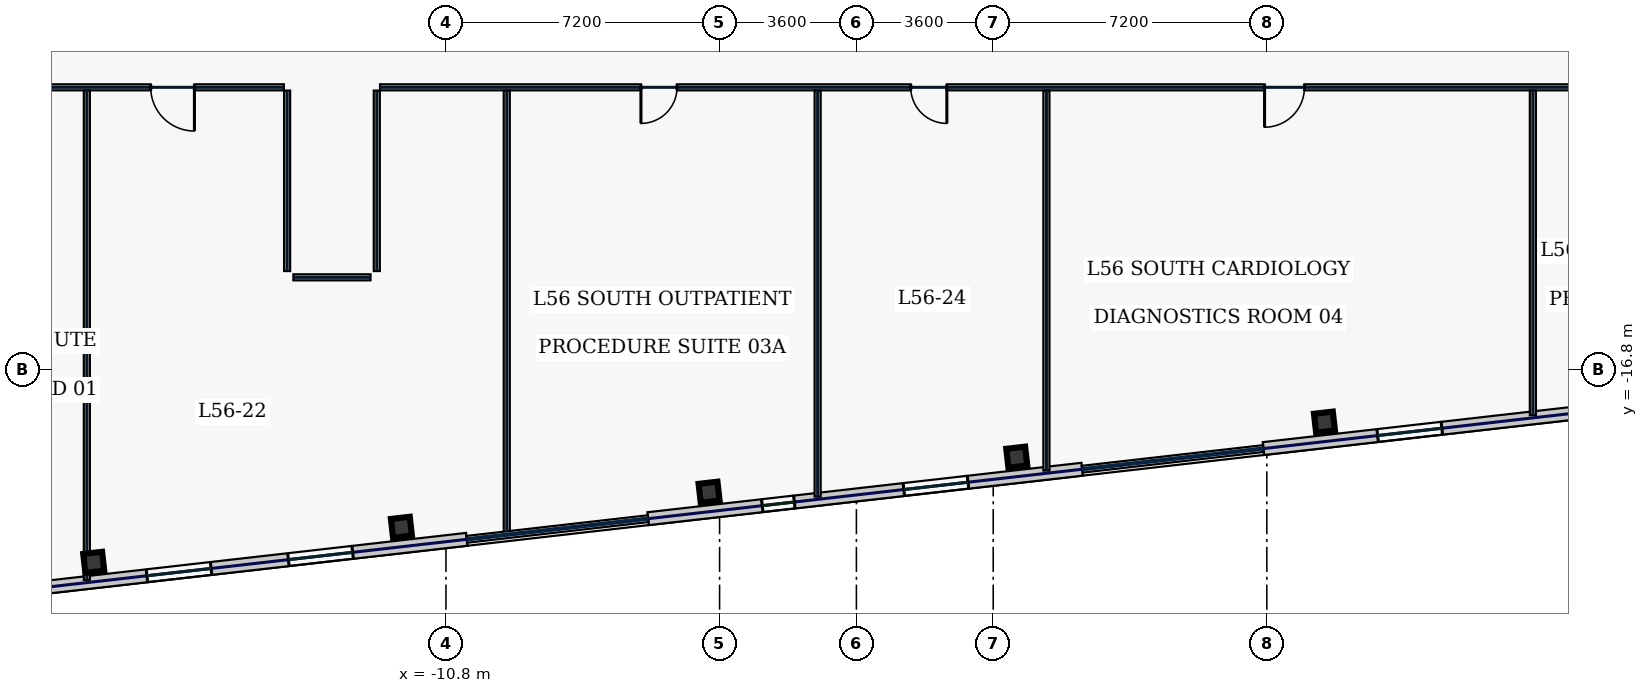
"""IFC4 building model, lengths in metres.
Left out: names, types, materials, properties, quantities, classifications, styles, units other than length and angle.
Written with IfcOpenShell. Run it as: python <this file> out.ifc"""

import sys

from ifc_helpers import new_model, si_unit, direction, frame, frame_2d, origin, origin_2d, place, context, subcontext, project, spatial, rectangle, hollow_rectangle, extrude, element, fill, save


model = new_model("IFC4")
c1 = context("Model", 3, precision=1e-05, world=origin(), true_north=direction((0.0, 1.0)))
c2 = subcontext(c1, "Body", "Model", "MODEL_VIEW")
j1 = project(units=[si_unit("LENGTHUNIT", "METRE"), si_unit("PLANEANGLEUNIT", "RADIAN")], contexts=[c1])
p1 = place(None, origin())
s1 = spatial("IfcSite", under=j1, at=p1, CompositionType="ELEMENT")
p2 = place(p1, origin())
s2 = spatial("IfcBuilding", under=s1, at=p2, CompositionType="ELEMENT")
p3 = place(p2, frame((0.0, 0.0, 243.0)))
s3 = spatial("IfcBuildingStorey", under=s2, at=p3, CompositionType="ELEMENT", Elevation=243.0)
for number, where, z_axis, x_axis in (
    (1, (-20.069, -21.88, 0.0), (0.0, 0.0, 1.0), (0.994, 0.113, 0.0)),
    (2, (-11.972, -20.958, 0.0), (0.0, 0.0, 1.0), (0.994, 0.113, 0.0)),
    (3, (-3.876, -20.035, 0.0), (0.0, 0.0, 1.0), (0.994, 0.113, 0.0)),
    (4, (4.22, -19.113, 0.0), (0.0, 0.0, 1.0), (0.994, 0.113, 0.0)),
    (5, (12.316, -18.19, 0.0), (0.0, 0.0, 1.0), (0.994, 0.113, 0.0)),
):
    element("IfcColumn", number, at=place(p3, frame(where, z_axis=z_axis, x_axis=x_axis)), inside=s3, PredefinedType="COLUMN", context=c2, shape_type="SweptSolid", body=[
        extrude(hollow_rectangle(XDim=0.5, YDim=0.5, WallThickness=0.025, at=origin_2d()), origin(), (0.0, 0.0, 1.0), 3.74),
    ])
p4 = place(p3, frame((-28.783, -23.386, 0.0), z_axis=(0.0, 0.0, 1.0), x_axis=(0.993572271362, 0.113199565282, 0.0)))
e6 = element("IfcWall", 6, at=p4, inside=s3, PredefinedType="STANDARD", context=c2, shape_type="SweptSolid", body=[
    extrude(rectangle(XDim=18.651, YDim=0.34, at=frame_2d((9.326, 0.0))), origin(), (0.0, 0.0, 1.0), 3.74),
])
p5 = place(p4, frame((2.03, 0.0, 0.88)))
e7 = element("IfcOpeningElement", 7, at=p5, cuts=e6, PredefinedType="OPENING", context=c2, shape_type="SweptSolid", body=[
    extrude(rectangle(XDim=0.85, YDim=1.85, at=frame_2d((0.425, 0.925))), frame((0.0, 0.18, 0.0), z_axis=(0.0, -1.0, 0.0), x_axis=(1.0, 0.0, 0.0)), (0.0, 0.0, 1.0), 0.36),
])
p6 = place(p4, frame((5.779, 0.0, 0.88)))
e8 = element("IfcOpeningElement", 8, at=p6, cuts=e6, PredefinedType="OPENING", context=c2, shape_type="SweptSolid", body=[
    extrude(rectangle(XDim=1.7, YDim=1.95, at=frame_2d((0.85, 0.975))), frame((0.0, 0.18, 0.0), z_axis=(0.0, -1.0, 0.0), x_axis=(1.0, 0.0, 0.0)), (0.0, 0.0, 1.0), 0.36),
])
p7 = place(p4, frame((10.179, 0.0, 0.88)))
e9 = element("IfcOpeningElement", 9, at=p7, cuts=e6, PredefinedType="OPENING", context=c2, shape_type="SweptSolid", body=[
    extrude(rectangle(XDim=1.7, YDim=1.95, at=frame_2d((0.85, 0.975))), frame((0.0, 0.18, 0.0), z_axis=(0.0, -1.0, 0.0), x_axis=(1.0, 0.0, 0.0)), (0.0, 0.0, 1.0), 0.36),
])
p8 = place(p4, frame((13.927, 0.0, 0.88)))
e10 = element("IfcOpeningElement", 10, at=p8, cuts=e6, PredefinedType="OPENING", context=c2, shape_type="SweptSolid", body=[
    extrude(rectangle(XDim=1.7, YDim=1.95, at=frame_2d((0.85, 0.975))), frame((0.0, 0.18, 0.0), z_axis=(0.0, -1.0, 0.0), x_axis=(1.0, 0.0, 0.0)), (0.0, 0.0, 1.0), 0.36),
])
p9 = place(p3, frame((-5.482, -20.731, 0.0), z_axis=(0.0, 0.0, 1.0), x_axis=(0.993571968199, 0.113202226169, 0.0)))
e11 = element("IfcWall", 11, at=p9, inside=s3, PredefinedType="STANDARD", context=c2, shape_type="SweptSolid", body=[
    extrude(rectangle(XDim=11.497, YDim=0.34, at=frame_2d((5.749, 0.0))), origin(), (0.0, 0.0, 1.0), 3.74),
])
p10 = place(p9, frame((3.024, 0.0, 0.88)))
e12 = element("IfcOpeningElement", 12, at=p10, cuts=e11, PredefinedType="OPENING", context=c2, shape_type="SweptSolid", body=[
    extrude(rectangle(XDim=0.85, YDim=1.85, at=frame_2d((0.425, 0.925))), frame((0.0, 0.18, 0.0), z_axis=(0.0, -1.0, 0.0), x_axis=(1.0, 0.0, 0.0)), (0.0, 0.0, 1.0), 0.36),
])
p11 = place(p9, frame((6.773, 0.0, 0.88)))
e13 = element("IfcOpeningElement", 13, at=p11, cuts=e11, PredefinedType="OPENING", context=c2, shape_type="SweptSolid", body=[
    extrude(rectangle(XDim=1.7, YDim=1.95, at=frame_2d((0.85, 0.975))), frame((0.0, 0.18, 0.0), z_axis=(0.0, -1.0, 0.0), x_axis=(1.0, 0.0, 0.0)), (0.0, 0.0, 1.0), 0.36),
])
p12 = place(p3, frame((10.71, -18.886, 0.0), z_axis=(0.0, 0.0, 1.0), x_axis=(0.993572271362, 0.113199565282, 0.0)))
e14 = element("IfcWall", 14, at=p12, inside=s3, PredefinedType="STANDARD", context=c2, shape_type="SweptSolid", body=[
    extrude(rectangle(XDim=18.651, YDim=0.34, at=frame_2d((9.326, 0.0))), origin(), (0.0, 0.0, 1.0), 3.74),
])
p13 = place(p12, frame((3.024, 0.0, 0.88)))
e15 = element("IfcOpeningElement", 15, at=p13, cuts=e14, PredefinedType="OPENING", context=c2, shape_type="SweptSolid", body=[
    extrude(rectangle(XDim=1.7, YDim=1.95, at=frame_2d((0.85, 0.975))), frame((0.0, 0.18, 0.0), z_axis=(0.0, -1.0, 0.0), x_axis=(1.0, 0.0, 0.0)), (0.0, 0.0, 1.0), 0.36),
])
p14 = place(p12, frame((11.173, 0.0, 0.88)))
e16 = element("IfcOpeningElement", 16, at=p14, cuts=e14, PredefinedType="OPENING", context=c2, shape_type="SweptSolid", body=[
    extrude(rectangle(XDim=1.7, YDim=1.95, at=frame_2d((0.85, 0.975))), frame((0.0, 0.18, 0.0), z_axis=(0.0, -1.0, 0.0), x_axis=(1.0, 0.0, 0.0)), (0.0, 0.0, 1.0), 0.36),
])
p15 = place(p12, frame((14.921, 0.0, 0.88)))
e17 = element("IfcOpeningElement", 17, at=p15, cuts=e14, PredefinedType="OPENING", context=c2, shape_type="SweptSolid", body=[
    extrude(rectangle(XDim=1.7, YDim=1.95, at=frame_2d((0.85, 0.975))), frame((0.0, 0.18, 0.0), z_axis=(0.0, -1.0, 0.0), x_axis=(1.0, 0.0, 0.0)), (0.0, 0.0, 1.0), 0.36),
])
p16 = place(p3, frame((24.815, -9.38, 0.0), z_axis=(0.0, 0.0, 1.0), x_axis=(-1.0, 0.0, 0.0)))
e18 = element("IfcWall", 18, at=p16, inside=s3, PredefinedType="PARTITIONING", context=c2, shape_type="SweptSolid", body=[
    extrude(rectangle(XDim=37.35, YDim=0.16, at=frame_2d((18.675, 0.0))), origin(), (0.0, 0.0, 1.0), 3.74),
])
p17 = place(p16, frame((29.535, 0.0, 0.0)))
e19 = element("IfcOpeningElement", 19, at=p17, cuts=e18, PredefinedType="OPENING", context=c2, shape_type="SweptSolid", body=[
    extrude(rectangle(XDim=0.95, YDim=2.2, at=frame_2d((0.475, 1.1))), frame((0.0, 0.09, 0.0), z_axis=(0.0, -1.0, 0.0), x_axis=(1.0, 0.0, 0.0)), (0.0, 0.0, 1.0), 0.18),
])
p18 = place(p16, frame((22.435, 0.0, 0.0)))
e20 = element("IfcOpeningElement", 20, at=p18, cuts=e18, PredefinedType="OPENING", context=c2, shape_type="SweptSolid", body=[
    extrude(rectangle(XDim=0.95, YDim=2.2, at=frame_2d((0.475, 1.1))), frame((0.0, 0.09, 0.0), z_axis=(0.0, -1.0, 0.0), x_axis=(1.0, 0.0, 0.0)), (0.0, 0.0, 1.0), 0.18),
])
p19 = place(p16, frame((13.025, 0.0, 0.0)))
e21 = element("IfcOpeningElement", 21, at=p19, cuts=e18, PredefinedType="OPENING", context=c2, shape_type="SweptSolid", body=[
    extrude(rectangle(XDim=1.05, YDim=2.2, at=frame_2d((0.525, 1.1))), frame((0.0, 0.09, 0.0), z_axis=(0.0, -1.0, 0.0), x_axis=(1.0, 0.0, 0.0)), (0.0, 0.0, 1.0), 0.18),
])
p20 = place(p16, frame((3.269, 0.0, 0.0)))
e22 = element("IfcOpeningElement", 22, at=p20, cuts=e18, PredefinedType="OPENING", context=c2, shape_type="SweptSolid", body=[
    extrude(rectangle(XDim=0.95, YDim=2.2, at=frame_2d((0.475, 1.1))), frame((0.0, 0.09, 0.0), z_axis=(0.0, -1.0, 0.0), x_axis=(1.0, 0.0, 0.0)), (0.0, 0.0, 1.0), 0.18),
])
p21 = place(p3, frame((-12.62, -9.465, 0.0), z_axis=(0.0, 0.0, 1.0), x_axis=(0.0, -1.0, 0.0)))
e23 = element("IfcWall", 23, at=p21, inside=s3, PredefinedType="PARTITIONING", context=c2, shape_type="SweptSolid", body=[
    extrude(rectangle(XDim=4.75, YDim=0.16, at=frame_2d((2.375, 0.0))), origin(), (0.0, 0.0, 1.0), 3.74),
])
p22 = place(p3, frame((-12.785, -14.38, 0.0), z_axis=(0.0, 0.0, 1.0), x_axis=(-1.0, 0.0, 0.0)))
e24 = element("IfcWall", 24, at=p22, inside=s3, PredefinedType="PARTITIONING", context=c2, shape_type="SweptSolid", body=[
    extrude(rectangle(XDim=2.03, YDim=0.16, at=frame_2d((1.015, 0.0))), origin(), (0.0, 0.0, 1.0), 3.74),
])
p23 = place(p3, frame((-14.98, -14.215, 0.0), z_axis=(0.0, 0.0, 1.0), x_axis=(0.0, 1.0, 0.0)))
e25 = element("IfcWall", 25, at=p23, inside=s3, PredefinedType="PARTITIONING", context=c2, shape_type="SweptSolid", body=[
    extrude(rectangle(XDim=4.75, YDim=0.16, at=frame_2d((2.375, 0.0))), origin(), (0.0, 0.0, 1.0), 3.74),
])
p24 = place(p3, frame((-15.065, -9.38, 0.0), z_axis=(0.0, 0.0, 1.0), x_axis=(-1.0, 0.0, 0.0)))
e26 = element("IfcWall", 26, at=p24, inside=s3, PredefinedType="PARTITIONING", context=c2, shape_type="SweptSolid", body=[
    extrude(rectangle(XDim=9.75, YDim=0.16, at=frame_2d((4.875, 0.0))), origin(), (0.0, 0.0, 1.0), 3.74),
])
p25 = place(p24, frame((6.751, 0.0, 0.0)))
e27 = element("IfcOpeningElement", 27, at=p25, cuts=e26, PredefinedType="OPENING", context=c2, shape_type="SweptSolid", body=[
    extrude(rectangle(XDim=1.3, YDim=2.2, at=frame_2d((0.65, 1.1))), frame((0.0, 0.09, 0.0), z_axis=(0.0, -1.0, 0.0), x_axis=(1.0, 0.0, 0.0)), (0.0, 0.0, 1.0), 0.18),
])
p26 = place(p24, frame((2.354, 0.0, 0.0)))
e28 = element("IfcOpeningElement", 28, at=p26, cuts=e26, PredefinedType="OPENING", context=c2, shape_type="SweptSolid", body=[
    extrude(rectangle(XDim=1.15, YDim=2.2, at=frame_2d((0.575, 1.1))), frame((0.0, 0.09, 0.0), z_axis=(0.0, -1.0, 0.0), x_axis=(1.0, 0.0, 0.0)), (0.0, 0.0, 1.0), 0.18),
])
p27 = place(p3, frame((-20.25, -22.344, 0.0), z_axis=(0.0, 0.0, 1.0), x_axis=(0.0, 1.0, 0.0)))
e29 = element("IfcWall", 29, at=p27, inside=s3, PredefinedType="PARTITIONING", context=c2, shape_type="SweptSolid", body=[
    extrude(rectangle(XDim=12.878, YDim=0.16, at=frame_2d((6.439, 0.0))), origin(), (0.0, 0.0, 1.0), 3.74),
])
p28 = place(p3, frame((-9.2, -21.085, 0.0), z_axis=(0.0, 0.0, 1.0), x_axis=(0.0, 1.0, 0.0)))
e30 = element("IfcWall", 30, at=p28, inside=s3, PredefinedType="PARTITIONING", context=c2, shape_type="SweptSolid", body=[
    extrude(rectangle(XDim=11.62, YDim=0.16, at=frame_2d((5.81, 0.0))), origin(), (0.0, 0.0, 1.0), 3.74),
])
p29 = place(p3, frame((5.0, -19.467, 0.0), z_axis=(0.0, 0.0, 1.0), x_axis=(0.0, 1.0, 0.0)))
e31 = element("IfcWall", 31, at=p29, inside=s3, PredefinedType="PARTITIONING", context=c2, shape_type="SweptSolid", body=[
    extrude(rectangle(XDim=10.002, YDim=0.16, at=frame_2d((5.001, 0.0))), origin(), (0.0, 0.0, 1.0), 3.74),
])
p30 = place(p3, frame((17.8, -18.008, 0.0), z_axis=(0.0, 0.0, 1.0), x_axis=(0.0, 1.0, 0.0)))
e32 = element("IfcWall", 32, at=p30, inside=s3, PredefinedType="PARTITIONING", context=c2, shape_type="SweptSolid", body=[
    extrude(rectangle(XDim=8.543, YDim=0.16, at=frame_2d((4.271, 0.0))), origin(), (0.0, 0.0, 1.0), 3.74),
])
p31 = place(p3, frame((-1.02, -20.153, 0.0), z_axis=(0.0, 0.0, 1.0), x_axis=(0.0, 1.0, 0.0)))
e33 = element("IfcWall", 33, at=p31, inside=s3, PredefinedType="PARTITIONING", context=c2, shape_type="SweptSolid", body=[
    extrude(rectangle(XDim=10.688, YDim=0.16, at=frame_2d((5.344, 0.0))), origin(), (0.0, 0.0, 1.0), 3.74),
])
p32 = place(p7, origin())
e34 = element("IfcWindow", 34, at=p32, inside=s3, PartitioningType="SINGLE_PANEL", PredefinedType="WINDOW", context=c2, shape_type="SweptSolid", body=[
    extrude(rectangle(XDim=1.7, YDim=1.95, at=frame_2d((0.85, 0.975))), frame((0.0, 0.03, 0.0), z_axis=(0.0, -1.0, 0.0), x_axis=(1.0, 0.0, 0.0)), (0.0, 0.0, 1.0), 0.06),
])
fill(e9, e34)
p33 = place(p8, origin())
e35 = element("IfcWindow", 35, at=p33, inside=s3, PartitioningType="SINGLE_PANEL", PredefinedType="WINDOW", context=c2, shape_type="SweptSolid", body=[
    extrude(rectangle(XDim=1.7, YDim=1.95, at=frame_2d((0.85, 0.975))), frame((0.0, 0.03, 0.0), z_axis=(0.0, -1.0, 0.0), x_axis=(1.0, 0.0, 0.0)), (0.0, 0.0, 1.0), 0.06),
])
fill(e10, e35)
p34 = place(p10, origin())
e36 = element("IfcWindow", 36, at=p34, inside=s3, PartitioningType="SINGLE_PANEL", PredefinedType="WINDOW", context=c2, shape_type="SweptSolid", body=[
    extrude(rectangle(XDim=0.85, YDim=1.85, at=frame_2d((0.425, 0.925))), frame((0.0, 0.03, 0.0), z_axis=(0.0, -1.0, 0.0), x_axis=(1.0, 0.0, 0.0)), (0.0, 0.0, 1.0), 0.06),
])
fill(e12, e36)
p35 = place(p11, origin())
e37 = element("IfcWindow", 37, at=p35, inside=s3, PartitioningType="SINGLE_PANEL", PredefinedType="WINDOW", context=c2, shape_type="SweptSolid", body=[
    extrude(rectangle(XDim=1.7, YDim=1.95, at=frame_2d((0.85, 0.975))), frame((0.0, 0.03, 0.0), z_axis=(0.0, -1.0, 0.0), x_axis=(1.0, 0.0, 0.0)), (0.0, 0.0, 1.0), 0.06),
])
fill(e13, e37)
p36 = place(p13, origin())
e38 = element("IfcWindow", 38, at=p36, inside=s3, PartitioningType="SINGLE_PANEL", PredefinedType="WINDOW", context=c2, shape_type="SweptSolid", body=[
    extrude(rectangle(XDim=1.7, YDim=1.95, at=frame_2d((0.85, 0.975))), frame((0.0, 0.03, 0.0), z_axis=(0.0, -1.0, 0.0), x_axis=(1.0, 0.0, 0.0)), (0.0, 0.0, 1.0), 0.06),
])
fill(e15, e38)
p37 = place(p26, origin())
e39 = element("IfcDoor", 39, at=p37, inside=s3, OperationType="SINGLE_SWING_LEFT", PredefinedType="DOOR", context=c2, shape_type="SweptSolid", body=[
    extrude(rectangle(XDim=1.15, YDim=2.2, at=frame_2d((0.575, 1.1))), frame((0.0, 0.025, 0.0), z_axis=(0.0, -1.0, 0.0), x_axis=(1.0, 0.0, 0.0)), (0.0, 0.0, 1.0), 0.05),
])
fill(e28, e39)
p38 = place(p17, origin())
e40 = element("IfcDoor", 40, at=p38, inside=s3, OperationType="SINGLE_SWING_RIGHT", PredefinedType="DOOR", context=c2, shape_type="SweptSolid", body=[
    extrude(rectangle(XDim=0.95, YDim=2.2, at=frame_2d((0.475, 1.1))), frame((0.0, 0.025, 0.0), z_axis=(0.0, -1.0, 0.0), x_axis=(1.0, 0.0, 0.0)), (0.0, 0.0, 1.0), 0.05),
])
fill(e19, e40)
p39 = place(p18, origin())
e41 = element("IfcDoor", 41, at=p39, inside=s3, OperationType="SINGLE_SWING_LEFT", PredefinedType="DOOR", context=c2, shape_type="SweptSolid", body=[
    extrude(rectangle(XDim=0.95, YDim=2.2, at=frame_2d((0.475, 1.1))), frame((0.0, 0.025, 0.0), z_axis=(0.0, -1.0, 0.0), x_axis=(1.0, 0.0, 0.0)), (0.0, 0.0, 1.0), 0.05),
])
fill(e20, e41)
p40 = place(p19, origin())
e42 = element("IfcDoor", 42, at=p40, inside=s3, OperationType="SINGLE_SWING_RIGHT", PredefinedType="DOOR", context=c2, shape_type="SweptSolid", body=[
    extrude(rectangle(XDim=1.05, YDim=2.2, at=frame_2d((0.525, 1.1))), frame((0.0, 0.025, 0.0), z_axis=(0.0, -1.0, 0.0), x_axis=(1.0, 0.0, 0.0)), (0.0, 0.0, 1.0), 0.05),
])
fill(e21, e42)
save(model, sys.argv[1])
